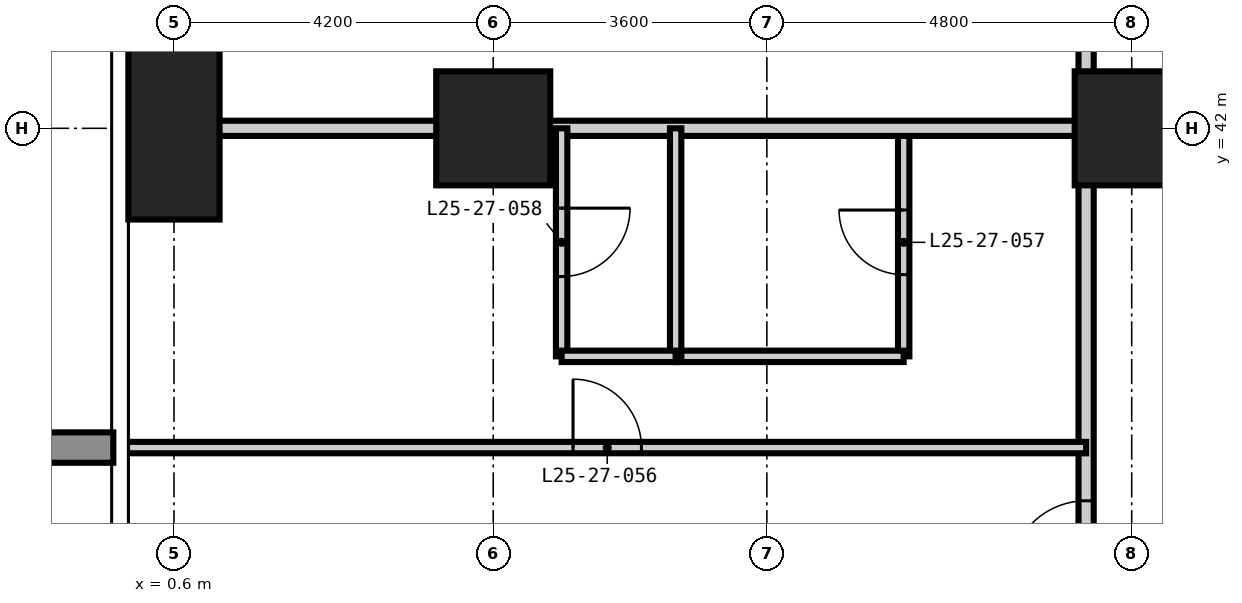
"""IFC4 building model, lengths in metres.
Left out: names, types, materials, properties, quantities, classifications, styles, units other than length and angle.
Written with IfcOpenShell. Run it as: python <this file> out.ifc"""

import sys

from ifc_helpers import new_model, si_unit, direction, frame, frame_2d, origin, origin_2d, place, context, subcontext, project, spatial, rectangle, extrude, element, fill, save


model = new_model("IFC4")
c1 = context("Model", 3, precision=1e-05, world=origin(), true_north=direction((0.0, 1.0)))
c2 = subcontext(c1, "Body", "Model", "MODEL_VIEW")
j1 = project(units=[si_unit("LENGTHUNIT", "METRE"), si_unit("PLANEANGLEUNIT", "RADIAN")], contexts=[c1])
p1 = place(None, origin())
s1 = spatial("IfcSite", under=j1, at=p1, CompositionType="ELEMENT")
p2 = place(p1, origin())
s2 = spatial("IfcBuilding", under=s1, at=p2, CompositionType="ELEMENT")
p3 = place(p2, frame((0.0, 0.0, 100.8)))
s3 = spatial("IfcBuildingStorey", under=s2, at=p3, CompositionType="ELEMENT", Elevation=100.8)
p4 = place(p3, frame((0.6, 42.0, -0.35), z_axis=(0.0, 0.0, 1.0), x_axis=(1.0, 0.0, 0.0)))
e1 = element("IfcColumn", 1, at=p4, inside=s3, PredefinedType="COLUMN", context=c2, shape_type="SweptSolid", body=[
    extrude(rectangle(XDim=1.2, YDim=2.4, at=origin_2d()), origin(), (0.0, 0.0, 1.0), 3.6),
])
for number, where, z_axis, x_axis in (
    (2, (4.8, 42.0, -0.35), (0.0, 0.0, 1.0), (1.0, 0.0, 0.0)),
    (3, (13.2, 42.0, -0.35), (0.0, 0.0, 1.0), (1.0, 0.0, 0.0)),
):
    element("IfcColumn", number, at=place(p3, frame(where, z_axis=z_axis, x_axis=x_axis)), inside=s3, PredefinedType="COLUMN", context=c2, shape_type="SweptSolid", body=[
        extrude(rectangle(XDim=1.5, YDim=1.5, at=origin_2d()), origin(), (0.0, 0.0, 1.0), 3.6),
    ])
p5 = place(p3, frame((10.2, 39.0, 0.0), z_axis=(0.0, 0.0, 1.0), x_axis=(0.0, 1.0, 0.0)))
e4 = element("IfcWall", 4, at=p5, inside=s3, PredefinedType="PARTITIONING", context=c2, shape_type="SweptSolid", body=[
    extrude(rectangle(XDim=3.0, YDim=0.15, at=frame_2d((1.5, 0.0))), origin(), (0.0, 0.0, 1.0), 3.25),
])
p6 = place(p5, frame((1.075, 0.0, 0.0)))
e5 = element("IfcOpeningElement", 5, at=p6, cuts=e4, PredefinedType="OPENING", context=c2, shape_type="SweptSolid", body=[
    extrude(rectangle(XDim=0.85, YDim=2.1, at=frame_2d((0.425, 1.05))), frame((0.0, 0.085, 0.0), z_axis=(0.0, -1.0, 0.0), x_axis=(1.0, 0.0, 0.0)), (0.0, 0.0, 1.0), 0.17),
])
p7 = place(p3, frame((7.2, 39.0, 0.0), z_axis=(0.0, 0.0, 1.0), x_axis=(1.0, 0.0, 0.0)))
e6 = element("IfcWall", 6, at=p7, inside=s3, PredefinedType="PARTITIONING", context=c2, shape_type="SweptSolid", body=[
    extrude(rectangle(XDim=3.0, YDim=0.15, at=frame_2d((1.5, 0.0))), origin(), (0.0, 0.0, 1.0), 3.25),
])
p8 = place(p3, frame((12.6, 14.075, 0.0), z_axis=(0.0, 0.0, 1.0), x_axis=(0.0, 1.0, 0.0)))
e7 = element("IfcWall", 7, at=p8, inside=s3, PredefinedType="PARTITIONING", context=c2, shape_type="SweptSolid", body=[
    extrude(rectangle(XDim=31.25, YDim=0.2, at=frame_2d((15.625, 0.0))), origin(), (0.0, 0.0, 1.0), 3.25),
])
p9 = place(p8, frame((5.225, 0.0, 0.0)))
e8 = element("IfcOpeningElement", 8, at=p9, cuts=e7, PredefinedType="OPENING", context=c2, shape_type="SweptSolid", body=[
    extrude(rectangle(XDim=1.0, YDim=2.2, at=frame_2d((0.5, 1.1))), frame((0.0, 0.11, 0.0), z_axis=(0.0, -1.0, 0.0), x_axis=(1.0, 0.0, 0.0)), (0.0, 0.0, 1.0), 0.22),
])
p10 = place(p8, frame((13.625, 0.0, 0.0)))
e9 = element("IfcOpeningElement", 9, at=p10, cuts=e7, PredefinedType="OPENING", context=c2, shape_type="SweptSolid", body=[
    extrude(rectangle(XDim=1.0, YDim=2.2, at=frame_2d((0.5, 1.1))), frame((0.0, 0.11, 0.0), z_axis=(0.0, -1.0, 0.0), x_axis=(1.0, 0.0, 0.0)), (0.0, 0.0, 1.0), 0.22),
])
p11 = place(p8, frame((22.025, 0.0, 0.0)))
e10 = element("IfcOpeningElement", 10, at=p11, cuts=e7, PredefinedType="OPENING", context=c2, shape_type="SweptSolid", body=[
    extrude(rectangle(XDim=1.0, YDim=2.2, at=frame_2d((0.5, 1.1))), frame((0.0, 0.11, 0.0), z_axis=(0.0, -1.0, 0.0), x_axis=(1.0, 0.0, 0.0)), (0.0, 0.0, 1.0), 0.22),
])
p12 = place(p8, frame((0.863, 0.0, 0.0)))
e11 = element("IfcOpeningElement", 11, at=p12, cuts=e7, PredefinedType="OPENING", context=c2, shape_type="SweptSolid", body=[
    extrude(rectangle(XDim=1.0, YDim=2.2, at=frame_2d((0.5, 1.1))), frame((0.0, 0.11, 0.0), z_axis=(0.0, -1.0, 0.0), x_axis=(1.0, 0.0, 0.0)), (0.0, 0.0, 1.0), 0.22),
])
p13 = place(p8, frame((29.088, 0.0, 0.0)))
e12 = element("IfcOpeningElement", 12, at=p13, cuts=e7, PredefinedType="OPENING", context=c2, shape_type="SweptSolid", body=[
    extrude(rectangle(XDim=1.0, YDim=2.2, at=frame_2d((0.5, 1.1))), frame((0.0, 0.11, 0.0), z_axis=(0.0, -1.0, 0.0), x_axis=(1.0, 0.0, 0.0)), (0.0, 0.0, 1.0), 0.22),
])
p14 = place(p3, frame((-0.018, 42.0, 0.0), z_axis=(0.0, 0.0, 1.0), x_axis=(1.0, 0.0, 0.0)))
e13 = element("IfcWall", 13, at=p14, inside=s3, PredefinedType="PARTITIONING", context=c2, shape_type="SweptSolid", body=[
    extrude(rectangle(XDim=12.618, YDim=0.2, at=frame_2d((6.309, 0.0))), origin(), (0.0, 0.0, 1.0), 3.25),
])
p15 = place(p3, frame((5.7, 39.0, 0.0), z_axis=(0.0, 0.0, 1.0), x_axis=(0.0, 1.0, 0.0)))
e14 = element("IfcWall", 14, at=p15, inside=s3, PredefinedType="PARTITIONING", context=c2, shape_type="SweptSolid", body=[
    extrude(rectangle(XDim=3.0, YDim=0.15, at=frame_2d((1.5, 0.0))), origin(), (0.0, 0.0, 1.0), 3.25),
])
p16 = place(p15, frame((1.05, 0.0, 0.0)))
e15 = element("IfcOpeningElement", 15, at=p16, cuts=e14, PredefinedType="OPENING", context=c2, shape_type="SweptSolid", body=[
    extrude(rectangle(XDim=0.9, YDim=2.1, at=frame_2d((0.45, 1.05))), frame((0.0, 0.085, 0.0), z_axis=(0.0, -1.0, 0.0), x_axis=(1.0, 0.0, 0.0)), (0.0, 0.0, 1.0), 0.17),
])
p17 = place(p3, frame((7.2, 39.0, 0.0), z_axis=(0.0, 0.0, 1.0), x_axis=(0.0, 1.0, 0.0)))
e16 = element("IfcWall", 16, at=p17, inside=s3, PredefinedType="PARTITIONING", context=c2, shape_type="SweptSolid", body=[
    extrude(rectangle(XDim=3.0, YDim=0.15, at=frame_2d((1.5, 0.0))), origin(), (0.0, 0.0, 1.0), 3.25),
])
p18 = place(p3, frame((-0.018, 37.8, 0.0), z_axis=(0.0, 0.0, 1.0), x_axis=(1.0, 0.0, 0.0)))
e17 = element("IfcWall", 17, at=p18, inside=s3, PredefinedType="PARTITIONING", context=c2, shape_type="SweptSolid", body=[
    extrude(rectangle(XDim=12.618, YDim=0.15, at=frame_2d((6.309, 0.0))), origin(), (0.0, 0.0, 1.0), 3.25),
])
p19 = place(p18, frame((5.868, 0.0, 0.0)))
e18 = element("IfcOpeningElement", 18, at=p19, cuts=e17, PredefinedType="OPENING", context=c2, shape_type="SweptSolid", body=[
    extrude(rectangle(XDim=0.9, YDim=2.1, at=frame_2d((0.45, 1.05))), frame((0.0, 0.085, 0.0), z_axis=(0.0, -1.0, 0.0), x_axis=(1.0, 0.0, 0.0)), (0.0, 0.0, 1.0), 0.17),
])
p20 = place(p3, frame((5.7, 39.0, 0.0), z_axis=(0.0, 0.0, 1.0), x_axis=(1.0, 0.0, 0.0)))
e19 = element("IfcWall", 19, at=p20, inside=s3, PredefinedType="PARTITIONING", context=c2, shape_type="SweptSolid", body=[
    extrude(rectangle(XDim=1.5, YDim=0.15, at=frame_2d((0.75, 0.0))), origin(), (0.0, 0.0, 1.0), 3.25),
])
p21 = place(p11, origin())
e20 = element("IfcDoor", 20, at=p21, inside=s3, OperationType="SINGLE_SWING_LEFT", PredefinedType="DOOR", context=c2, shape_type="SweptSolid", body=[
    extrude(rectangle(XDim=1.0, YDim=2.2, at=frame_2d((0.5, 1.1))), frame((0.0, 0.025, 0.0), z_axis=(0.0, -1.0, 0.0), x_axis=(1.0, 0.0, 0.0)), (0.0, 0.0, 1.0), 0.05),
])
fill(e10, e20)
p22 = place(p19, origin())
e21 = element("IfcDoor", 21, at=p22, inside=s3, OperationType="SINGLE_SWING_LEFT", PredefinedType="DOOR", context=c2, shape_type="SweptSolid", body=[
    extrude(rectangle(XDim=0.9, YDim=2.1, at=frame_2d((0.45, 1.05))), frame((0.0, 0.025, 0.0), z_axis=(0.0, -1.0, 0.0), x_axis=(1.0, 0.0, 0.0)), (0.0, 0.0, 1.0), 0.05),
])
fill(e18, e21)
p23 = place(p6, origin())
e22 = element("IfcDoor", 22, at=p23, inside=s3, OperationType="SINGLE_SWING_RIGHT", PredefinedType="DOOR", context=c2, shape_type="SweptSolid", body=[
    extrude(rectangle(XDim=0.85, YDim=2.1, at=frame_2d((0.425, 1.05))), frame((0.0, 0.025, 0.0), z_axis=(0.0, -1.0, 0.0), x_axis=(1.0, 0.0, 0.0)), (0.0, 0.0, 1.0), 0.05),
])
fill(e5, e22)
p24 = place(p16, frame((0.9, 0.0, 0.0), z_axis=(0.0, 0.0, 1.0), x_axis=(-1.0, 0.0, 0.0)))
e23 = element("IfcDoor", 23, at=p24, inside=s3, OperationType="SINGLE_SWING_LEFT", PredefinedType="DOOR", context=c2, shape_type="SweptSolid", body=[
    extrude(rectangle(XDim=0.9, YDim=2.1, at=frame_2d((0.45, 1.05))), frame((0.0, 0.025, 0.0), z_axis=(0.0, -1.0, 0.0), x_axis=(1.0, 0.0, 0.0)), (0.0, 0.0, 1.0), 0.05),
])
fill(e15, e23)
save(model, sys.argv[1])
